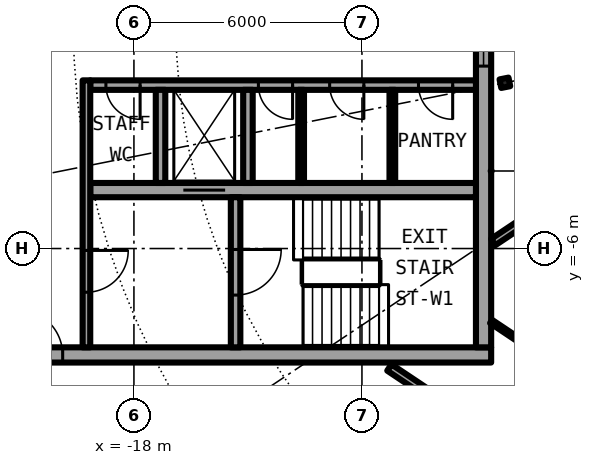
"""IFC4 building model, lengths in metres.
Left out: names, types, materials, properties, quantities, classifications, styles, units other than length and angle.
Written with IfcOpenShell. Run it as: python <this file> out.ifc"""

import sys

from ifc_helpers import new_model, si_unit, direction, frame, frame_2d, origin, origin_2d, place, context, subcontext, project, spatial, rectangle, i_section, extrude, element, fill, save


model = new_model("IFC4")
c1 = context("Model", 3, precision=1e-05, world=origin(), true_north=direction((0.0, 1.0)))
c2 = subcontext(c1, "Body", "Model", "MODEL_VIEW")
j1 = project(units=[si_unit("LENGTHUNIT", "METRE"), si_unit("PLANEANGLEUNIT", "RADIAN")], contexts=[c1])
p1 = place(None, origin())
s1 = spatial("IfcSite", under=j1, at=p1, CompositionType="ELEMENT")
p2 = place(p1, origin())
s2 = spatial("IfcBuilding", under=s1, at=p2, CompositionType="ELEMENT")
p3 = place(p2, frame((0.0, 0.0, 243.2)))
s3 = spatial("IfcBuildingStorey", under=s2, at=p3, CompositionType="ELEMENT", Elevation=243.2)
p4 = place(p3, frame((-8.239, -1.639, 0.0), z_axis=(0.0, 0.0, 1.0), x_axis=(-0.980785280403, -0.195090322016, 0.0)))
e1 = element("IfcColumn", 1, at=p4, inside=s3, PredefinedType="COLUMN", context=c2, shape_type="SweptSolid", body=[
    extrude(i_section(OverallWidth=0.24, OverallDepth=0.23, WebThickness=0.008, FlangeThickness=0.012, FilletRadius=0.021, at=origin_2d()), origin(), (0.0, 0.0, 1.0), 3.05),
])
p5 = place(p3, frame((-22.0, -8.8, 0.0), z_axis=(0.0, 0.0, 1.0), x_axis=(1.0, 0.0, 0.0)))
e2 = element("IfcWall", 2, at=p5, inside=s3, PredefinedType="SHEAR", context=c2, shape_type="SweptSolid", body=[
    extrude(rectangle(XDim=13.4, YDim=0.4, at=frame_2d((6.7, 0.0))), origin(), (0.0, 0.0, 1.0), 3.05),
])
p6 = place(p5, frame((0.925, 0.0, 0.0)))
e3 = element("IfcOpeningElement", 3, at=p6, cuts=e2, PredefinedType="OPENING", context=c2, shape_type="SweptSolid", body=[
    extrude(rectangle(XDim=1.2, YDim=2.3, at=frame_2d((0.6, 1.15))), frame((0.0, 0.21, 0.0), z_axis=(0.0, -1.0, 0.0), x_axis=(1.0, 0.0, 0.0)), (0.0, 0.0, 1.0), 0.42),
])
p7 = place(p3, frame((-8.8, 8.6, 0.0), z_axis=(0.0, 0.0, 1.0), x_axis=(0.0, -1.0, 0.0)))
e4 = element("IfcWall", 4, at=p7, inside=s3, PredefinedType="SHEAR", context=c2, shape_type="SweptSolid", body=[
    extrude(rectangle(XDim=17.2, YDim=0.4, at=frame_2d((8.6, 0.0))), origin(), (0.0, 0.0, 1.0), 3.05),
])
p8 = place(p7, frame((7.4, 0.0, 0.1)))
e5 = element("IfcOpeningElement", 5, at=p8, cuts=e4, PredefinedType="OPENING", context=c2, shape_type="SweptSolid", body=[
    extrude(rectangle(XDim=2.4, YDim=2.2, at=frame_2d((1.2, 1.1))), frame((0.0, 0.21, 0.0), z_axis=(0.0, -1.0, 0.0), x_axis=(1.0, 0.0, 0.0)), (0.0, 0.0, 1.0), 0.42),
])
p9 = place(p3, frame((-9.0, -1.7, 0.0), z_axis=(0.0, 0.0, 1.0), x_axis=(-1.0, 0.0, 0.0)))
e6 = element("IfcWall", 6, at=p9, inside=s3, PredefinedType="SHEAR", context=c2, shape_type="SweptSolid", body=[
    extrude(rectangle(XDim=10.15, YDim=0.25, at=frame_2d((5.075, 0.0))), origin(), (0.0, 0.0, 1.0), 3.05),
])
p10 = place(p9, frame((0.613, 0.0, 0.0)))
e7 = element("IfcOpeningElement", 7, at=p10, cuts=e6, PredefinedType="OPENING", context=c2, shape_type="SweptSolid", body=[
    extrude(rectangle(XDim=0.9, YDim=2.3, at=frame_2d((0.45, 1.15))), frame((0.0, 0.135, 0.0), z_axis=(0.0, -1.0, 0.0), x_axis=(1.0, 0.0, 0.0)), (0.0, 0.0, 1.0), 0.27),
])
p11 = place(p9, frame((2.95, 0.0, 0.0)))
e8 = element("IfcOpeningElement", 8, at=p11, cuts=e6, PredefinedType="OPENING", context=c2, shape_type="SweptSolid", body=[
    extrude(rectangle(XDim=0.9, YDim=2.3, at=frame_2d((0.45, 1.15))), frame((0.0, 0.135, 0.0), z_axis=(0.0, -1.0, 0.0), x_axis=(1.0, 0.0, 0.0)), (0.0, 0.0, 1.0), 0.27),
])
p12 = place(p9, frame((4.825, 0.0, 0.0)))
e9 = element("IfcOpeningElement", 9, at=p12, cuts=e6, PredefinedType="OPENING", context=c2, shape_type="SweptSolid", body=[
    extrude(rectangle(XDim=0.9, YDim=2.3, at=frame_2d((0.45, 1.15))), frame((0.0, 0.135, 0.0), z_axis=(0.0, -1.0, 0.0), x_axis=(1.0, 0.0, 0.0)), (0.0, 0.0, 1.0), 0.27),
])
p13 = place(p9, frame((8.837, 0.0, 0.0)))
e10 = element("IfcOpeningElement", 10, at=p13, cuts=e6, PredefinedType="OPENING", context=c2, shape_type="SweptSolid", body=[
    extrude(rectangle(XDim=0.9, YDim=2.3, at=frame_2d((0.45, 1.15))), frame((0.0, 0.135, 0.0), z_axis=(0.0, -1.0, 0.0), x_axis=(1.0, 0.0, 0.0)), (0.0, 0.0, 1.0), 0.27),
])
p14 = place(p3, frame((-9.0, -4.462, 0.0), z_axis=(0.0, 0.0, 1.0), x_axis=(-1.0, 0.0, 0.0)))
e11 = element("IfcWall", 11, at=p14, inside=s3, PredefinedType="SHEAR", context=c2, shape_type="SweptSolid", body=[
    extrude(rectangle(XDim=10.15, YDim=0.375, at=frame_2d((5.075, 0.0))), origin(), (0.0, 0.0, 1.0), 3.05),
])
p15 = place(p14, frame((6.6, 0.0, 0.0)))
e12 = element("IfcOpeningElement", 12, at=p15, cuts=e11, PredefinedType="OPENING", context=c2, shape_type="SweptSolid", body=[
    extrude(rectangle(XDim=1.1, YDim=2.3, at=frame_2d((0.55, 1.15))), frame((0.0, 0.198, 0.0), z_axis=(0.0, -1.0, 0.0), x_axis=(1.0, 0.0, 0.0)), (0.0, 0.0, 1.0), 0.395),
])
p16 = place(p3, frame((-15.325, -4.65, 0.0), z_axis=(0.0, 0.0, 1.0), x_axis=(0.0, -1.0, 0.0)))
e13 = element("IfcWall", 13, at=p16, inside=s3, PredefinedType="SHEAR", context=c2, shape_type="SweptSolid", body=[
    extrude(rectangle(XDim=3.95, YDim=0.25, at=frame_2d((1.975, 0.0))), origin(), (0.0, 0.0, 1.0), 3.05),
])
p17 = place(p16, frame((1.375, 0.0, 0.0)))
e14 = element("IfcOpeningElement", 14, at=p17, cuts=e13, PredefinedType="OPENING", context=c2, shape_type="SweptSolid", body=[
    extrude(rectangle(XDim=1.2, YDim=2.3, at=frame_2d((0.6, 1.15))), frame((0.0, 0.135, 0.0), z_axis=(0.0, -1.0, 0.0), x_axis=(1.0, 0.0, 0.0)), (0.0, 0.0, 1.0), 0.27),
])
for number, where, z_axis, x_axis in (
    (15, (-15.0, -1.825, 0.0), (0.0, 0.0, 1.0), (0.0, -1.0, 0.0)),
    (16, (-17.3, -1.825, 0.0), (0.0, 0.0, 1.0), (0.0, -1.0, 0.0)),
):
    element("IfcWall", number, at=place(p3, frame(where, z_axis=z_axis, x_axis=x_axis)), inside=s3, PredefinedType="SOLIDWALL", context=c2, shape_type="SweptSolid", body=[
        extrude(rectangle(XDim=2.45, YDim=0.25, at=frame_2d((1.225, 0.0))), origin(), (0.0, 0.0, 1.0), 2.7),
    ])
p18 = place(p3, frame((-19.25, -1.575, 0.0), z_axis=(0.0, 0.0, 1.0), x_axis=(0.0, -1.0, 0.0)))
e17 = element("IfcWall", 17, at=p18, inside=s3, PredefinedType="SOLIDWALL", context=c2, shape_type="SweptSolid", body=[
    extrude(rectangle(XDim=7.025, YDim=0.2, at=frame_2d((3.513, 0.0))), origin(), (0.0, 0.0, 1.0), 2.7),
])
p19 = place(p18, frame((4.475, 0.0, 0.0)))
e18 = element("IfcOpeningElement", 18, at=p19, cuts=e17, PredefinedType="OPENING", context=c2, shape_type="SweptSolid", body=[
    extrude(rectangle(XDim=1.1, YDim=2.3, at=frame_2d((0.55, 1.15))), frame((0.0, 0.11, 0.0), z_axis=(0.0, -1.0, 0.0), x_axis=(1.0, 0.0, 0.0)), (0.0, 0.0, 1.0), 0.22),
])
for number, where, z_axis, x_axis in (
    (19, (-11.2, -1.825, 0.0), (0.0, 0.0, 1.0), (0.0, -1.0, 0.0)),
    (20, (-13.6, -1.825, 0.0), (0.0, 0.0, 1.0), (0.0, -1.0, 0.0)),
):
    element("IfcWall", number, at=place(p3, frame(where, z_axis=z_axis, x_axis=x_axis)), inside=s3, PredefinedType="PARTITIONING", context=c2, shape_type="SweptSolid", body=[
        extrude(rectangle(XDim=2.45, YDim=0.15, at=frame_2d((1.225, 0.0))), origin(), (0.0, 0.0, 1.0), 2.7),
    ])
p20 = place(p3, frame((-11.279, -9.131, 0.0), z_axis=(0.0, 0.0, 1.0), x_axis=(0.831522779461, -0.555490654501, 0.0)))
e21 = element("IfcWall", 21, at=p20, inside=s3, PredefinedType="PARTITIONING", context=c2, shape_type="SweptSolid", body=[
    extrude(rectangle(XDim=10.047, YDim=0.2, at=frame_2d((5.023, 0.0))), origin(), (0.0, 0.0, 1.0), 2.7),
])
p21 = place(p20, frame((5.239, 0.0, 0.0)))
e22 = element("IfcOpeningElement", 22, at=p21, cuts=e21, PredefinedType="OPENING", context=c2, shape_type="SweptSolid", body=[
    extrude(rectangle(XDim=1.0, YDim=2.3, at=frame_2d((0.5, 1.15))), frame((0.0, 0.11, 0.0), z_axis=(0.0, -1.0, 0.0), x_axis=(1.0, 0.0, 0.0)), (0.0, 0.0, 1.0), 0.22),
])
p22 = place(p3, frame((-8.601, -7.92, 0.0), z_axis=(0.0, 0.0, 1.0), x_axis=(0.83141852367, -0.555646684953, 0.0)))
e23 = element("IfcWall", 23, at=p22, inside=s3, PredefinedType="PARTITIONING", context=c2, shape_type="SweptSolid", body=[
    extrude(rectangle(XDim=3.927, YDim=0.1, at=frame_2d((1.964, 0.0))), origin(), (0.0, 0.0, 1.0), 2.7),
])
p23 = place(p3, frame((-6.513, -4.472, 0.0), z_axis=(0.0, 0.0, 1.0), x_axis=(-0.831450132577, -0.555599385382, 0.0)))
e24 = element("IfcWall", 24, at=p23, inside=s3, PredefinedType="PARTITIONING", context=c2, shape_type="SweptSolid", body=[
    extrude(rectangle(XDim=2.443, YDim=0.2, at=frame_2d((1.221, 0.0))), origin(), (0.0, 0.0, 1.0), 2.7),
])
p24 = place(p15, origin())
e25 = element("IfcDoor", 25, at=p24, inside=s3, OperationType="DOUBLE_DOOR_SLIDING", PredefinedType="DOOR", context=c2, shape_type="SweptSolid", body=[
    extrude(rectangle(XDim=1.1, YDim=2.3, at=frame_2d((0.55, 1.15))), frame((0.0, 0.025, 0.0), z_axis=(0.0, -1.0, 0.0), x_axis=(1.0, 0.0, 0.0)), (0.0, 0.0, 1.0), 0.05),
])
fill(e12, e25)
p25 = place(p10, origin())
e26 = element("IfcDoor", 26, at=p25, inside=s3, OperationType="SINGLE_SWING_RIGHT", PredefinedType="DOOR", context=c2, shape_type="SweptSolid", body=[
    extrude(rectangle(XDim=0.9, YDim=2.3, at=frame_2d((0.45, 1.15))), frame((0.0, 0.025, 0.0), z_axis=(0.0, -1.0, 0.0), x_axis=(1.0, 0.0, 0.0)), (0.0, 0.0, 1.0), 0.05),
])
fill(e7, e26)
p26 = place(p11, origin())
e27 = element("IfcDoor", 27, at=p26, inside=s3, OperationType="SINGLE_SWING_RIGHT", PredefinedType="DOOR", context=c2, shape_type="SweptSolid", body=[
    extrude(rectangle(XDim=0.9, YDim=2.3, at=frame_2d((0.45, 1.15))), frame((0.0, 0.025, 0.0), z_axis=(0.0, -1.0, 0.0), x_axis=(1.0, 0.0, 0.0)), (0.0, 0.0, 1.0), 0.05),
])
fill(e8, e27)
p27 = place(p12, origin())
e28 = element("IfcDoor", 28, at=p27, inside=s3, OperationType="SINGLE_SWING_LEFT", PredefinedType="DOOR", context=c2, shape_type="SweptSolid", body=[
    extrude(rectangle(XDim=0.9, YDim=2.3, at=frame_2d((0.45, 1.15))), frame((0.0, 0.025, 0.0), z_axis=(0.0, -1.0, 0.0), x_axis=(1.0, 0.0, 0.0)), (0.0, 0.0, 1.0), 0.05),
])
fill(e9, e28)
p28 = place(p13, origin())
e29 = element("IfcDoor", 29, at=p28, inside=s3, OperationType="SINGLE_SWING_LEFT", PredefinedType="DOOR", context=c2, shape_type="SweptSolid", body=[
    extrude(rectangle(XDim=0.9, YDim=2.3, at=frame_2d((0.45, 1.15))), frame((0.0, 0.025, 0.0), z_axis=(0.0, -1.0, 0.0), x_axis=(1.0, 0.0, 0.0)), (0.0, 0.0, 1.0), 0.05),
])
fill(e10, e29)
p29 = place(p17, origin())
e30 = element("IfcDoor", 30, at=p29, inside=s3, OperationType="SINGLE_SWING_LEFT", PredefinedType="DOOR", context=c2, shape_type="SweptSolid", body=[
    extrude(rectangle(XDim=1.2, YDim=2.3, at=frame_2d((0.6, 1.15))), frame((0.0, 0.025, 0.0), z_axis=(0.0, -1.0, 0.0), x_axis=(1.0, 0.0, 0.0)), (0.0, 0.0, 1.0), 0.05),
])
fill(e14, e30)
p30 = place(p19, origin())
e31 = element("IfcDoor", 31, at=p30, inside=s3, OperationType="SINGLE_SWING_LEFT", PredefinedType="DOOR", context=c2, shape_type="SweptSolid", body=[
    extrude(rectangle(XDim=1.1, YDim=2.3, at=frame_2d((0.55, 1.15))), frame((0.0, 0.025, 0.0), z_axis=(0.0, -1.0, 0.0), x_axis=(1.0, 0.0, 0.0)), (0.0, 0.0, 1.0), 0.05),
])
fill(e18, e31)
p31 = place(p6, origin())
e32 = element("IfcDoor", 32, at=p31, inside=s3, OperationType="SINGLE_SWING_RIGHT", PredefinedType="DOOR", context=c2, shape_type="SweptSolid", body=[
    extrude(rectangle(XDim=1.2, YDim=2.3, at=frame_2d((0.6, 1.15))), frame((0.0, 0.025, 0.0), z_axis=(0.0, -1.0, 0.0), x_axis=(1.0, 0.0, 0.0)), (0.0, 0.0, 1.0), 0.05),
])
fill(e3, e32)
p32 = place(p8, origin())
e33 = element("IfcWindow", 33, at=p32, inside=s3, PartitioningType="SINGLE_PANEL", PredefinedType="WINDOW", context=c2, shape_type="SweptSolid", body=[
    extrude(rectangle(XDim=2.4, YDim=2.2, at=frame_2d((1.2, 1.1))), frame((0.0, 0.03, 0.0), z_axis=(0.0, -1.0, 0.0), x_axis=(1.0, 0.0, 0.0)), (0.0, 0.0, 1.0), 0.06),
])
fill(e5, e33)
save(model, sys.argv[1])
